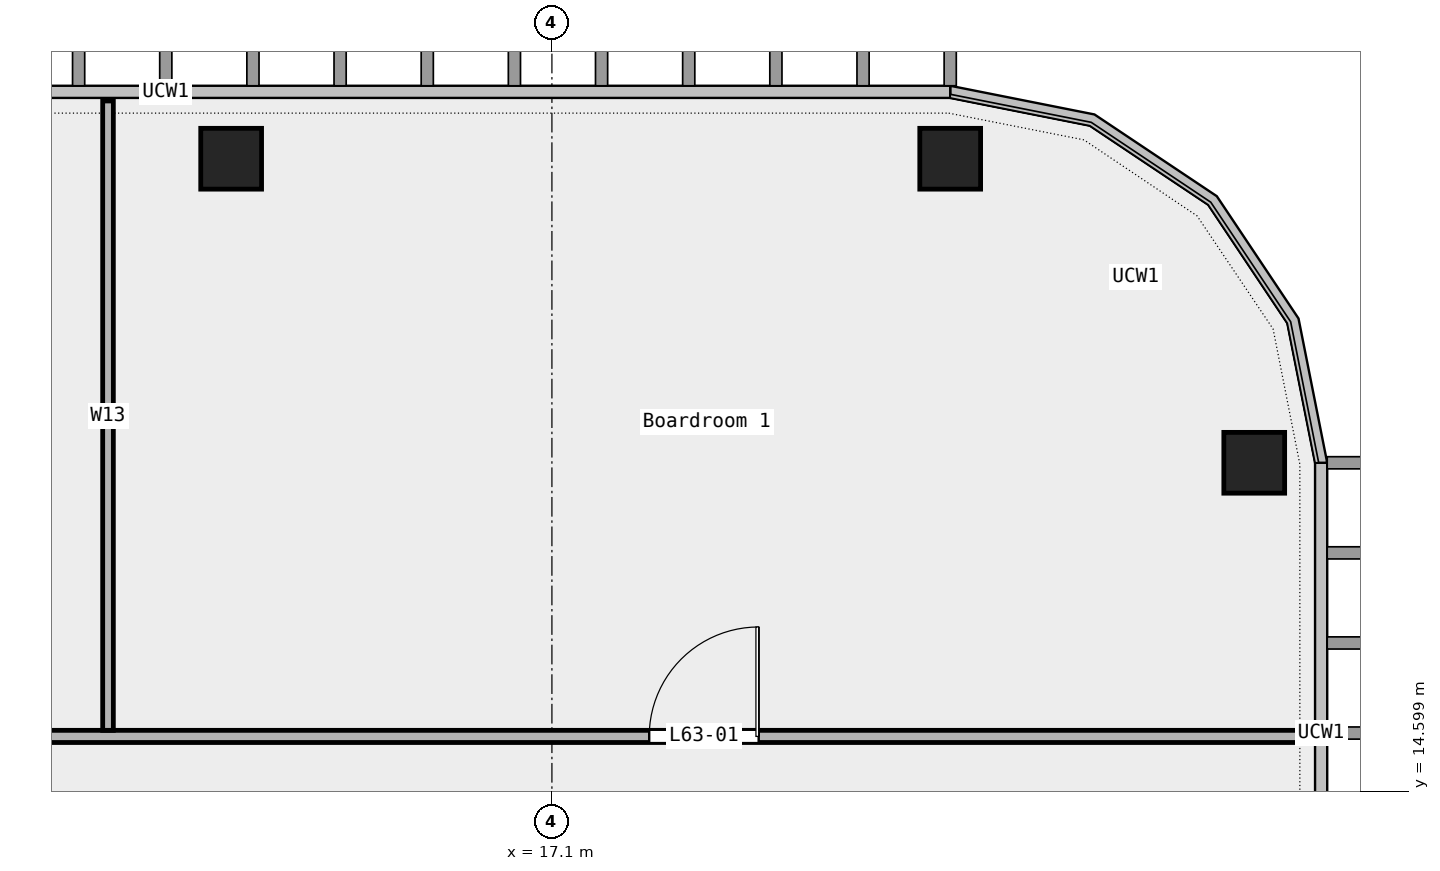
"""IFC4 building model, lengths in metres.
Left out: names, types, materials, properties, quantities, classifications, styles, units other than length and angle.
Written with IfcOpenShell. Run it as: python <this file> out.ifc"""

import sys

from ifc_helpers import new_model, si_unit, direction, frame, frame_2d, origin, origin_2d, place, context, subcontext, project, spatial, rectangle, extrude, element, fill, save


model = new_model("IFC4")
c1 = context("Model", 3, precision=1e-05, world=origin(), true_north=direction((0.0, 1.0)))
c2 = subcontext(c1, "Body", "Model", "MODEL_VIEW")
j1 = project(units=[si_unit("LENGTHUNIT", "METRE"), si_unit("PLANEANGLEUNIT", "RADIAN")], contexts=[c1])
p1 = place(None, origin())
s1 = spatial("IfcSite", under=j1, at=p1, CompositionType="ELEMENT")
p2 = place(p1, origin())
s2 = spatial("IfcBuilding", under=s1, at=p2, CompositionType="ELEMENT")
p3 = place(p2, frame((0.0, 0.0, 291.4)))
s3 = spatial("IfcBuildingStorey", under=s2, at=p3, CompositionType="ELEMENT", Elevation=291.4)
for number, where, z_axis, x_axis in (
    (1, (28.65, 20.0, 0.0), (0.0, 0.0, 1.0), (1.0, 0.0, 0.0)),
    (2, (23.65, 25.0, 0.0), (0.0, 0.0, 1.0), (1.0, 0.0, 0.0)),
    (3, (11.825, 25.0, 0.0), (0.0, 0.0, 1.0), (1.0, 0.0, 0.0)),
):
    element("IfcColumn", number, at=place(p3, frame(where, z_axis=z_axis, x_axis=x_axis)), inside=s3, PredefinedType="COLUMN", context=c2, shape_type="SweptSolid", body=[
        extrude(rectangle(XDim=1.0, YDim=1.0, at=origin_2d()), origin(), (0.0, 0.0, 1.0), 3.6),
    ])
p4 = place(p3, frame((-29.6, 15.5, 0.0), z_axis=(0.0, 0.0, 1.0), x_axis=(1.0, 0.0, 0.0)))
e4 = element("IfcWall", 4, at=p4, inside=s3, PredefinedType="PARTITIONING", context=c2, shape_type="SweptSolid", body=[
    extrude(rectangle(XDim=59.2, YDim=0.2, at=frame_2d((29.6, 0.0))), origin(), (0.0, 0.0, 1.0), 3.6),
])
p5 = place(p4, frame((48.3, 0.0, 0.0)))
e5 = element("IfcOpeningElement", 5, at=p5, cuts=e4, PredefinedType="OPENING", context=c2, shape_type="SweptSolid", body=[
    extrude(rectangle(XDim=1.8, YDim=2.1, at=frame_2d((0.9, 1.05))), frame((0.0, 0.112, 0.0), z_axis=(0.0, -1.0, 0.0), x_axis=(1.0, 0.0, 0.0)), (0.0, 0.0, 1.0), 0.224),
])
p6 = place(p4, frame((32.675, 0.0, 0.0)))
e6 = element("IfcOpeningElement", 6, at=p6, cuts=e4, PredefinedType="OPENING", context=c2, shape_type="SweptSolid", body=[
    extrude(rectangle(XDim=1.5, YDim=2.1, at=frame_2d((0.75, 1.05))), frame((0.0, 0.112, 0.0), z_axis=(0.0, -1.0, 0.0), x_axis=(1.0, 0.0, 0.0)), (0.0, 0.0, 1.0), 0.224),
])
p7 = place(p4, frame((6.625, 0.0, 0.0)))
e7 = element("IfcOpeningElement", 7, at=p7, cuts=e4, PredefinedType="OPENING", context=c2, shape_type="SweptSolid", body=[
    extrude(rectangle(XDim=1.5, YDim=2.1, at=frame_2d((0.75, 1.05))), frame((0.0, 0.112, 0.0), z_axis=(0.0, -1.0, 0.0), x_axis=(1.0, 0.0, 0.0)), (0.0, 0.0, 1.0), 0.224),
])
p8 = place(p4, frame((20.25, 0.0, 0.0)))
e8 = element("IfcOpeningElement", 8, at=p8, cuts=e4, PredefinedType="OPENING", context=c2, shape_type="SweptSolid", body=[
    extrude(rectangle(XDim=1.5, YDim=2.1, at=frame_2d((0.75, 1.05))), frame((0.0, 0.112, 0.0), z_axis=(0.0, -1.0, 0.0), x_axis=(1.0, 0.0, 0.0)), (0.0, 0.0, 1.0), 0.224),
])
p9 = place(p3, frame((9.8, 15.6, 0.0), z_axis=(0.0, 0.0, 1.0), x_axis=(0.0, 1.0, 0.0)))
e9 = element("IfcWall", 9, at=p9, inside=s3, PredefinedType="PARTITIONING", context=c2, shape_type="SweptSolid", body=[
    extrude(rectangle(XDim=10.35, YDim=0.175, at=frame_2d((5.175, 0.0))), origin(), (0.0, 0.0, 1.0), 3.6),
])
p10 = place(p5, origin())
e10 = element("IfcDoor", 10, at=p10, inside=s3, OperationType="DOUBLE_DOOR_SINGLE_SWING", PredefinedType="DOOR", context=c2, shape_type="SweptSolid", body=[
    extrude(rectangle(XDim=1.8, YDim=2.1, at=frame_2d((0.9, 1.05))), frame((0.0, 0.025, 0.0), z_axis=(0.0, -1.0, 0.0), x_axis=(1.0, 0.0, 0.0)), (0.0, 0.0, 1.0), 0.05),
])
fill(e5, e10)
save(model, sys.argv[1])
